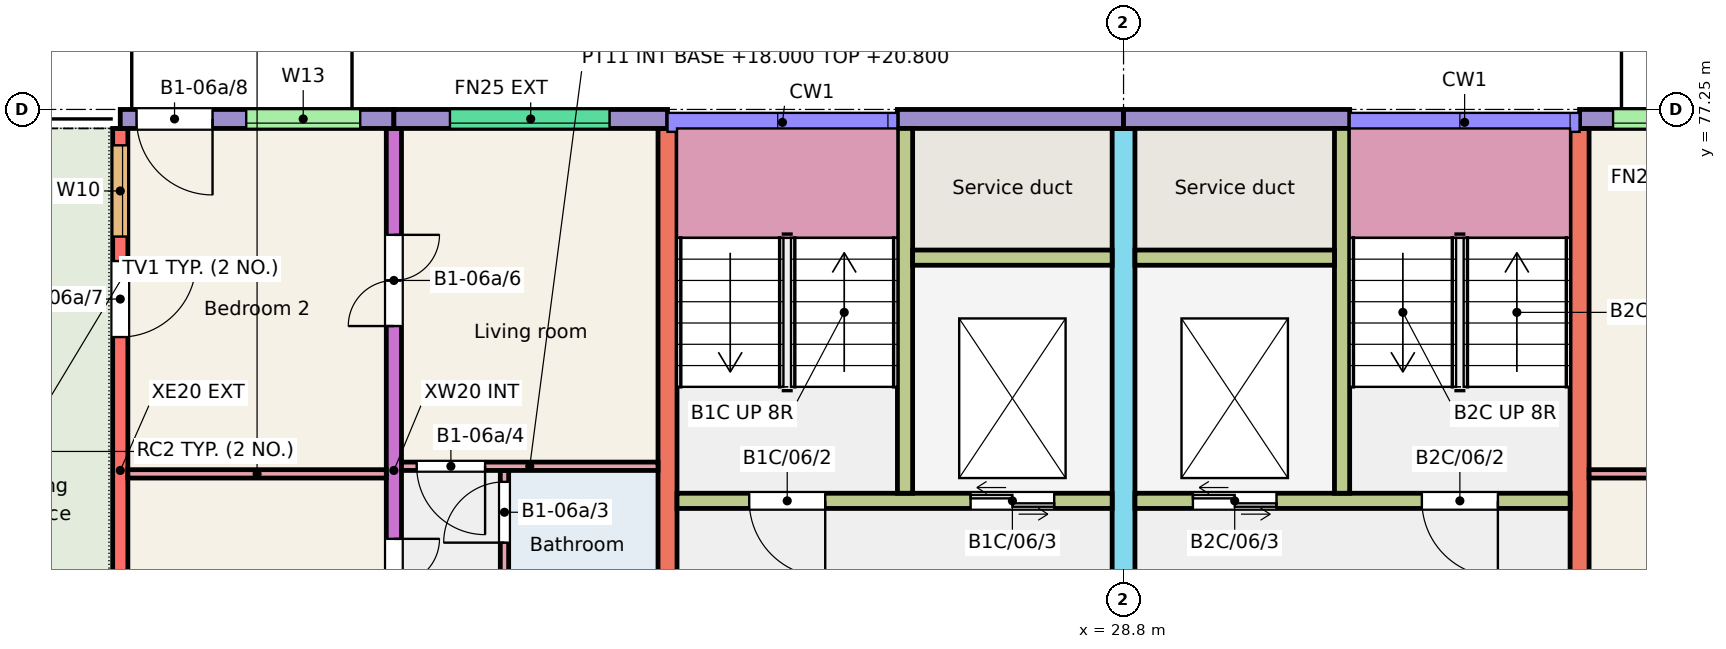
"""IFC4 building model, lengths in metres.
Left out: names, types, materials, properties, quantities, classifications, styles, units other than length and angle.
Written with IfcOpenShell. Run it as: python <this file> out.ifc"""

import sys

from ifc_helpers import new_model, si_unit, direction, frame, frame_2d, origin, place, context, subcontext, project, spatial, rectangle, extrude, element, fill, save


model = new_model("IFC4")
c1 = context("Model", 3, precision=1e-05, world=origin(), true_north=direction((0.0, 1.0)))
c2 = subcontext(c1, "Body", "Model", "MODEL_VIEW")
j1 = project(units=[si_unit("LENGTHUNIT", "METRE"), si_unit("PLANEANGLEUNIT", "RADIAN")], contexts=[c1])
p1 = place(None, origin())
s1 = spatial("IfcSite", under=j1, at=p1, CompositionType="ELEMENT")
p2 = place(p1, origin())
s2 = spatial("IfcBuilding", under=s1, at=p2, CompositionType="ELEMENT")
p3 = place(p2, frame((0.0, 0.0, 18.0)))
s3 = spatial("IfcBuildingStorey", under=s2, at=p3, CompositionType="ELEMENT", Elevation=18.0)
p4 = place(p3, frame((15.6, 68.0, 0.0), z_axis=(0.0, 0.0, 1.0), x_axis=(0.0, 1.0, 0.0)))
e1 = element("IfcWall", 1, at=p4, inside=s3, PredefinedType="SHEAR", context=c2, shape_type="SweptSolid", body=[
    extrude(rectangle(XDim=9.0, YDim=0.2, at=frame_2d((4.5, 0.0))), origin(), (0.0, 0.0, 1.0), 3.0),
])
p5 = place(p4, frame((1.45, 0.0, 0.9)))
e2 = element("IfcOpeningElement", 2, at=p5, cuts=e1, PredefinedType="OPENING", context=c2, shape_type="SweptSolid", body=[
    extrude(rectangle(XDim=1.5, YDim=1.5, at=frame_2d((0.75, 0.75))), frame((0.0, 0.11, 0.0), z_axis=(0.0, -1.0, 0.0), x_axis=(1.0, 0.0, 0.0)), (0.0, 0.0, 1.0), 0.22),
])
p6 = place(p4, frame((7.577, 0.0, 0.9)))
e3 = element("IfcOpeningElement", 3, at=p6, cuts=e1, PredefinedType="OPENING", context=c2, shape_type="SweptSolid", body=[
    extrude(rectangle(XDim=1.2, YDim=1.5, at=frame_2d((0.6, 0.75))), frame((0.0, 0.11, 0.0), z_axis=(0.0, -1.0, 0.0), x_axis=(1.0, 0.0, 0.0)), (0.0, 0.0, 1.0), 0.22),
])
p7 = place(p4, frame((6.255, 0.0, 0.0)))
e4 = element("IfcOpeningElement", 4, at=p7, cuts=e1, PredefinedType="OPENING", context=c2, shape_type="SweptSolid", body=[
    extrude(rectangle(XDim=1.0, YDim=2.1, at=frame_2d((0.5, 1.05))), frame((0.0, 0.11, 0.0), z_axis=(0.0, -1.0, 0.0), x_axis=(1.0, 0.0, 0.0)), (0.0, 0.0, 1.0), 0.22),
])
p8 = place(p3, frame((19.2, 68.0, 0.0), z_axis=(0.0, 0.0, 1.0), x_axis=(0.0, 1.0, 0.0)))
e5 = element("IfcWall", 5, at=p8, inside=s3, PredefinedType="SHEAR", context=c2, shape_type="SweptSolid", body=[
    extrude(rectangle(XDim=9.0, YDim=0.2, at=frame_2d((4.5, 0.0))), origin(), (0.0, 0.0, 1.0), 3.0),
])
p9 = place(p8, frame((2.4, 0.0, 0.0)))
e6 = element("IfcOpeningElement", 6, at=p9, cuts=e5, PredefinedType="OPENING", context=c2, shape_type="SweptSolid", body=[
    extrude(rectangle(XDim=1.2, YDim=2.1, at=frame_2d((0.6, 1.05))), frame((0.0, 0.11, 0.0), z_axis=(0.0, -1.0, 0.0), x_axis=(1.0, 0.0, 0.0)), (0.0, 0.0, 1.0), 0.22),
])
p10 = place(p8, frame((6.4, 0.0, 0.0)))
e7 = element("IfcOpeningElement", 7, at=p10, cuts=e5, PredefinedType="OPENING", context=c2, shape_type="SweptSolid", body=[
    extrude(rectangle(XDim=1.2, YDim=2.1, at=frame_2d((0.6, 1.05))), frame((0.0, 0.11, 0.0), z_axis=(0.0, -1.0, 0.0), x_axis=(1.0, 0.0, 0.0)), (0.0, 0.0, 1.0), 0.22),
])
p11 = place(p3, frame((22.8, 68.0, 0.0), z_axis=(0.0, 0.0, 1.0), x_axis=(0.0, 1.0, 0.0)))
e8 = element("IfcWall", 8, at=p11, inside=s3, PredefinedType="SHEAR", context=c2, shape_type="SweptSolid", body=[
    extrude(rectangle(XDim=9.0, YDim=0.25, at=frame_2d((4.5, 0.0))), origin(), (0.0, 0.0, 1.0), 3.0),
])
p12 = place(p3, frame((28.8, 66.0, 0.0), z_axis=(0.0, 0.0, 1.0), x_axis=(0.0, 1.0, 0.0)))
e9 = element("IfcWall", 9, at=p12, inside=s3, PredefinedType="SHEAR", context=c2, shape_type="SweptSolid", body=[
    extrude(rectangle(XDim=11.0, YDim=0.3, at=frame_2d((5.5, 0.0))), origin(), (0.0, 0.0, 1.0), 3.0),
])
p13 = place(p12, frame((0.3, 0.0, 0.0)))
e10 = element("IfcOpeningElement", 10, at=p13, cuts=e9, PredefinedType="OPENING", context=c2, shape_type="SweptSolid", body=[
    extrude(rectangle(XDim=1.2, YDim=2.1, at=frame_2d((0.6, 1.05))), frame((0.0, 0.16, 0.0), z_axis=(0.0, -1.0, 0.0), x_axis=(1.0, 0.0, 0.0)), (0.0, 0.0, 1.0), 0.32),
])
p14 = place(p3, frame((34.8, 68.0, 0.0), z_axis=(0.0, 0.0, 1.0), x_axis=(0.0, 1.0, 0.0)))
e11 = element("IfcWall", 11, at=p14, inside=s3, PredefinedType="SHEAR", context=c2, shape_type="SweptSolid", body=[
    extrude(rectangle(XDim=9.0, YDim=0.25, at=frame_2d((4.5, 0.0))), origin(), (0.0, 0.0, 1.0), 3.0),
])
p15 = place(p3, frame((15.6, 77.125, 0.0), z_axis=(0.0, 0.0, 1.0), x_axis=(1.0, 0.0, 0.0)))
e12 = element("IfcWall", 12, at=p15, inside=s3, PredefinedType="SOLIDWALL", context=c2, shape_type="SweptSolid", body=[
    extrude(rectangle(XDim=3.6, YDim=0.25, at=frame_2d((1.8, 0.0))), origin(), (0.0, 0.0, 1.0), 3.0),
])
p16 = place(p15, frame((1.657, 0.0, 1.2)))
e13 = element("IfcOpeningElement", 13, at=p16, cuts=e12, PredefinedType="OPENING", context=c2, shape_type="SweptSolid", body=[
    extrude(rectangle(XDim=1.5, YDim=1.2, at=frame_2d((0.75, 0.6))), frame((0.0, 0.135, 0.0), z_axis=(0.0, -1.0, 0.0), x_axis=(1.0, 0.0, 0.0)), (0.0, 0.0, 1.0), 0.27),
])
p17 = place(p15, frame((0.214, 0.0, 0.0)))
e14 = element("IfcOpeningElement", 14, at=p17, cuts=e12, PredefinedType="OPENING", context=c2, shape_type="SweptSolid", body=[
    extrude(rectangle(XDim=1.0, YDim=2.1, at=frame_2d((0.5, 1.05))), frame((0.0, 0.135, 0.0), z_axis=(0.0, -1.0, 0.0), x_axis=(1.0, 0.0, 0.0)), (0.0, 0.0, 1.0), 0.27),
])
p18 = place(p3, frame((19.2, 77.125, 0.0), z_axis=(0.0, 0.0, 1.0), x_axis=(1.0, 0.0, 0.0)))
e15 = element("IfcWall", 15, at=p18, inside=s3, PredefinedType="SOLIDWALL", context=c2, shape_type="SweptSolid", body=[
    extrude(rectangle(XDim=3.6, YDim=0.25, at=frame_2d((1.8, 0.0))), origin(), (0.0, 0.0, 1.0), 3.0),
])
p19 = place(p18, frame((0.738, 0.0, 1.2)))
e16 = element("IfcOpeningElement", 16, at=p19, cuts=e15, PredefinedType="OPENING", context=c2, shape_type="SweptSolid", body=[
    extrude(rectangle(XDim=2.1, YDim=1.2, at=frame_2d((1.05, 0.6))), frame((0.0, 0.135, 0.0), z_axis=(0.0, -1.0, 0.0), x_axis=(1.0, 0.0, 0.0)), (0.0, 0.0, 1.0), 0.27),
])
p20 = place(p3, frame((25.825, 77.125, 0.0), z_axis=(0.0, 0.0, 1.0), x_axis=(1.0, 0.0, 0.0)))
e17 = element("IfcWall", 17, at=p20, inside=s3, PredefinedType="SOLIDWALL", context=c2, shape_type="SweptSolid", body=[
    extrude(rectangle(XDim=2.975, YDim=0.25, at=frame_2d((1.488, 0.0))), origin(), (0.0, 0.0, 1.0), 3.0),
])
p21 = place(p3, frame((22.925, 72.1, 0.0), z_axis=(0.0, 0.0, 1.0), x_axis=(1.0, 0.0, 0.0)))
e18 = element("IfcWall", 18, at=p21, inside=s3, PredefinedType="SHEAR", context=c2, shape_type="SweptSolid", body=[
    extrude(rectangle(XDim=5.725, YDim=0.2, at=frame_2d((2.862, 0.0))), origin(), (0.0, 0.0, 1.0), 3.0),
])
p22 = place(p21, frame((0.95, 0.0, 0.0)))
e19 = element("IfcOpeningElement", 19, at=p22, cuts=e18, PredefinedType="OPENING", context=c2, shape_type="SweptSolid", body=[
    extrude(rectangle(XDim=1.0, YDim=2.1, at=frame_2d((0.5, 1.05))), frame((0.0, 0.11, 0.0), z_axis=(0.0, -1.0, 0.0), x_axis=(1.0, 0.0, 0.0)), (0.0, 0.0, 1.0), 0.22),
])
p23 = place(p21, frame((3.863, 0.0, 0.0)))
e20 = element("IfcOpeningElement", 20, at=p23, cuts=e18, PredefinedType="OPENING", context=c2, shape_type="SweptSolid", body=[
    extrude(rectangle(XDim=1.1, YDim=2.1, at=frame_2d((0.55, 1.05))), frame((0.0, 0.11, 0.0), z_axis=(0.0, -1.0, 0.0), x_axis=(1.0, 0.0, 0.0)), (0.0, 0.0, 1.0), 0.22),
])
p24 = place(p3, frame((25.925, 72.2, 0.0), z_axis=(0.0, 0.0, 1.0), x_axis=(0.0, 1.0, 0.0)))
e21 = element("IfcWall", 21, at=p24, inside=s3, PredefinedType="SHEAR", context=c2, shape_type="SweptSolid", body=[
    extrude(rectangle(XDim=4.8, YDim=0.2, at=frame_2d((2.4, 0.0))), origin(), (0.0, 0.0, 1.0), 3.0),
])
p25 = place(p3, frame((26.025, 75.3, 0.0), z_axis=(0.0, 0.0, 1.0), x_axis=(1.0, 0.0, 0.0)))
e22 = element("IfcWall", 22, at=p25, inside=s3, PredefinedType="SHEAR", context=c2, shape_type="SweptSolid", body=[
    extrude(rectangle(XDim=2.625, YDim=0.2, at=frame_2d((1.312, 0.0))), origin(), (0.0, 0.0, 1.0), 3.0),
])
p26 = place(p3, frame((28.8, 77.125, 0.0), z_axis=(0.0, 0.0, 1.0), x_axis=(1.0, 0.0, 0.0)))
e23 = element("IfcWall", 23, at=p26, inside=s3, PredefinedType="SOLIDWALL", context=c2, shape_type="SweptSolid", body=[
    extrude(rectangle(XDim=2.975, YDim=0.25, at=frame_2d((1.487, 0.0))), origin(), (0.0, 0.0, 1.0), 3.0),
])
p27 = place(p3, frame((28.95, 72.1, 0.0), z_axis=(0.0, 0.0, 1.0), x_axis=(1.0, 0.0, 0.0)))
e24 = element("IfcWall", 24, at=p27, inside=s3, PredefinedType="SHEAR", context=c2, shape_type="SweptSolid", body=[
    extrude(rectangle(XDim=5.725, YDim=0.2, at=frame_2d((2.863, 0.0))), origin(), (0.0, 0.0, 1.0), 3.0),
])
p28 = place(p27, frame((3.775, 0.0, 0.0)))
e25 = element("IfcOpeningElement", 25, at=p28, cuts=e24, PredefinedType="OPENING", context=c2, shape_type="SweptSolid", body=[
    extrude(rectangle(XDim=1.0, YDim=2.1, at=frame_2d((0.5, 1.05))), frame((0.0, 0.11, 0.0), z_axis=(0.0, -1.0, 0.0), x_axis=(1.0, 0.0, 0.0)), (0.0, 0.0, 1.0), 0.22),
])
p29 = place(p27, frame((0.762, 0.0, 0.0)))
e26 = element("IfcOpeningElement", 26, at=p29, cuts=e24, PredefinedType="OPENING", context=c2, shape_type="SweptSolid", body=[
    extrude(rectangle(XDim=1.1, YDim=2.1, at=frame_2d((0.55, 1.05))), frame((0.0, 0.11, 0.0), z_axis=(0.0, -1.0, 0.0), x_axis=(1.0, 0.0, 0.0)), (0.0, 0.0, 1.0), 0.22),
])
p30 = place(p3, frame((31.675, 72.2, 0.0), z_axis=(0.0, 0.0, 1.0), x_axis=(0.0, 1.0, 0.0)))
e27 = element("IfcWall", 27, at=p30, inside=s3, PredefinedType="SHEAR", context=c2, shape_type="SweptSolid", body=[
    extrude(rectangle(XDim=4.8, YDim=0.2, at=frame_2d((2.4, 0.0))), origin(), (0.0, 0.0, 1.0), 3.0),
])
p31 = place(p3, frame((28.95, 75.3, 0.0), z_axis=(0.0, 0.0, 1.0), x_axis=(1.0, 0.0, 0.0)))
e28 = element("IfcWall", 28, at=p31, inside=s3, PredefinedType="SHEAR", context=c2, shape_type="SweptSolid", body=[
    extrude(rectangle(XDim=2.625, YDim=0.2, at=frame_2d((1.312, 0.0))), origin(), (0.0, 0.0, 1.0), 3.0),
])
p32 = place(p3, frame((34.8, 77.125, 0.0), z_axis=(0.0, 0.0, 1.0), x_axis=(1.0, 0.0, 0.0)))
e29 = element("IfcWall", 29, at=p32, inside=s3, PredefinedType="SOLIDWALL", context=c2, shape_type="SweptSolid", body=[
    extrude(rectangle(XDim=3.6, YDim=0.25, at=frame_2d((1.8, 0.0))), origin(), (0.0, 0.0, 1.0), 3.0),
])
p33 = place(p32, frame((0.44, 0.0, 1.2)))
e30 = element("IfcOpeningElement", 30, at=p33, cuts=e29, PredefinedType="OPENING", context=c2, shape_type="SweptSolid", body=[
    extrude(rectangle(XDim=1.5, YDim=1.2, at=frame_2d((0.75, 0.6))), frame((0.0, 0.135, 0.0), z_axis=(0.0, -1.0, 0.0), x_axis=(1.0, 0.0, 0.0)), (0.0, 0.0, 1.0), 0.27),
])
p34 = place(p32, frame((2.356, 0.0, 0.0)))
e31 = element("IfcOpeningElement", 31, at=p34, cuts=e29, PredefinedType="OPENING", context=c2, shape_type="SweptSolid", body=[
    extrude(rectangle(XDim=1.0, YDim=2.1, at=frame_2d((0.5, 1.05))), frame((0.0, 0.135, 0.0), z_axis=(0.0, -1.0, 0.0), x_axis=(1.0, 0.0, 0.0)), (0.0, 0.0, 1.0), 0.27),
])
p35 = place(p3, frame((20.655, 68.0, 0.0), z_axis=(0.0, 0.0, 1.0), x_axis=(0.0, 1.0, 0.0)))
e32 = element("IfcWall", 32, at=p35, inside=s3, PredefinedType="PARTITIONING", context=c2, shape_type="SweptSolid", body=[
    extrude(rectangle(XDim=4.5, YDim=0.11, at=frame_2d((2.25, 0.0))), origin(), (0.0, 0.0, 1.0), 2.8),
])
p36 = place(p35, frame((0.2, 0.0, 0.0)))
e33 = element("IfcOpeningElement", 33, at=p36, cuts=e32, PredefinedType="OPENING", context=c2, shape_type="SweptSolid", body=[
    extrude(rectangle(XDim=0.8, YDim=2.1, at=frame_2d((0.4, 1.05))), frame((0.0, 0.065, 0.0), z_axis=(0.0, -1.0, 0.0), x_axis=(1.0, 0.0, 0.0)), (0.0, 0.0, 1.0), 0.13),
])
p37 = place(p35, frame((3.55, 0.0, 0.0)))
e34 = element("IfcOpeningElement", 34, at=p37, cuts=e32, PredefinedType="OPENING", context=c2, shape_type="SweptSolid", body=[
    extrude(rectangle(XDim=0.8, YDim=2.1, at=frame_2d((0.4, 1.05))), frame((0.0, 0.065, 0.0), z_axis=(0.0, -1.0, 0.0), x_axis=(1.0, 0.0, 0.0)), (0.0, 0.0, 1.0), 0.13),
])
p38 = place(p3, frame((19.3, 72.555, 0.0), z_axis=(0.0, 0.0, 1.0), x_axis=(1.0, 0.0, 0.0)))
e35 = element("IfcWall", 35, at=p38, inside=s3, PredefinedType="PARTITIONING", context=c2, shape_type="SweptSolid", body=[
    extrude(rectangle(XDim=3.375, YDim=0.11, at=frame_2d((1.688, 0.0))), origin(), (0.0, 0.0, 1.0), 2.8),
])
p39 = place(p38, frame((0.2, 0.0, 0.0)))
e36 = element("IfcOpeningElement", 36, at=p39, cuts=e35, PredefinedType="OPENING", context=c2, shape_type="SweptSolid", body=[
    extrude(rectangle(XDim=0.9, YDim=2.1, at=frame_2d((0.45, 1.05))), frame((0.0, 0.065, 0.0), z_axis=(0.0, -1.0, 0.0), x_axis=(1.0, 0.0, 0.0)), (0.0, 0.0, 1.0), 0.13),
])
p40 = place(p3, frame((15.7, 72.455, 0.0), z_axis=(0.0, 0.0, 1.0), x_axis=(1.0, 0.0, 0.0)))
e37 = element("IfcWall", 37, at=p40, inside=s3, PredefinedType="PARTITIONING", context=c2, shape_type="SweptSolid", body=[
    extrude(rectangle(XDim=3.4, YDim=0.11, at=frame_2d((1.7, 0.0))), origin(), (0.0, 0.0, 1.0), 2.75),
])
p41 = place(p3, frame((34.925, 72.455, 0.0), z_axis=(0.0, 0.0, 1.0), x_axis=(1.0, 0.0, 0.0)))
e38 = element("IfcWall", 38, at=p41, inside=s3, PredefinedType="PARTITIONING", context=c2, shape_type="SweptSolid", body=[
    extrude(rectangle(XDim=3.375, YDim=0.11, at=frame_2d((1.688, 0.0))), origin(), (0.0, 0.0, 1.0), 2.8),
])
p42 = place(p16, origin())
e39 = element("IfcWindow", 39, at=p42, inside=s3, PartitioningType="SINGLE_PANEL", PredefinedType="WINDOW", context=c2, shape_type="SweptSolid", body=[
    extrude(rectangle(XDim=1.5, YDim=1.2, at=frame_2d((0.75, 0.6))), frame((0.0, -0.025, 0.0), z_axis=(0.0, -1.0, 0.0), x_axis=(1.0, 0.0, 0.0)), (0.0, 0.0, 1.0), 0.06),
])
fill(e13, e39)
p43 = place(p19, origin())
e40 = element("IfcWindow", 40, at=p43, inside=s3, PartitioningType="SINGLE_PANEL", PredefinedType="WINDOW", context=c2, shape_type="SweptSolid", body=[
    extrude(rectangle(XDim=2.1, YDim=1.2, at=frame_2d((1.05, 0.6))), frame((0.0, -0.025, 0.0), z_axis=(0.0, -1.0, 0.0), x_axis=(1.0, 0.0, 0.0)), (0.0, 0.0, 1.0), 0.06),
])
fill(e16, e40)
p44 = place(p6, origin())
e41 = element("IfcWindow", 41, at=p44, inside=s3, PartitioningType="SINGLE_PANEL", PredefinedType="WINDOW", context=c2, shape_type="SweptSolid", body=[
    extrude(rectangle(XDim=1.2, YDim=1.5, at=frame_2d((0.6, 0.75))), frame((0.0, 0.0, 0.0), z_axis=(0.0, -1.0, 0.0), x_axis=(1.0, 0.0, 0.0)), (0.0, 0.0, 1.0), 0.06),
])
fill(e3, e41)
p45 = place(p33, origin())
e42 = element("IfcWindow", 42, at=p45, inside=s3, PartitioningType="SINGLE_PANEL", PredefinedType="WINDOW", context=c2, shape_type="SweptSolid", body=[
    extrude(rectangle(XDim=1.5, YDim=1.2, at=frame_2d((0.75, 0.6))), frame((0.0, -0.025, 0.0), z_axis=(0.0, -1.0, 0.0), x_axis=(1.0, 0.0, 0.0)), (0.0, 0.0, 1.0), 0.06),
])
fill(e30, e42)
p46 = place(p37, origin())
e43 = element("IfcDoor", 43, at=p46, inside=s3, OperationType="SINGLE_SWING_LEFT", PredefinedType="DOOR", context=c2, shape_type="SweptSolid", body=[
    extrude(rectangle(XDim=0.8, YDim=2.1, at=frame_2d((0.4, 1.05))), frame((0.0, 0.025, 0.0), z_axis=(0.0, -1.0, 0.0), x_axis=(1.0, 0.0, 0.0)), (0.0, 0.0, 1.0), 0.05),
])
fill(e34, e43)
p47 = place(p39, origin())
e44 = element("IfcDoor", 44, at=p47, inside=s3, OperationType="SINGLE_SWING_RIGHT", PredefinedType="DOOR", context=c2, shape_type="SweptSolid", body=[
    extrude(rectangle(XDim=0.9, YDim=2.1, at=frame_2d((0.45, 1.05))), frame((0.0, 0.025, 0.0), z_axis=(0.0, -1.0, 0.0), x_axis=(1.0, 0.0, 0.0)), (0.0, 0.0, 1.0), 0.05),
])
fill(e36, e44)
p48 = place(p9, origin())
e45 = element("IfcDoor", 45, at=p48, inside=s3, OperationType="DOUBLE_DOOR_SINGLE_SWING", PredefinedType="DOOR", context=c2, shape_type="SweptSolid", body=[
    extrude(rectangle(XDim=1.2, YDim=2.1, at=frame_2d((0.6, 1.05))), frame((0.0, 0.025, 0.0), z_axis=(0.0, -1.0, 0.0), x_axis=(1.0, 0.0, 0.0)), (0.0, 0.0, 1.0), 0.05),
])
fill(e6, e45)
p49 = place(p10, origin())
e46 = element("IfcDoor", 46, at=p49, inside=s3, OperationType="DOUBLE_DOOR_SINGLE_SWING", PredefinedType="DOOR", context=c2, shape_type="SweptSolid", body=[
    extrude(rectangle(XDim=1.2, YDim=2.1, at=frame_2d((0.6, 1.05))), frame((0.0, 0.025, 0.0), z_axis=(0.0, -1.0, 0.0), x_axis=(1.0, 0.0, 0.0)), (0.0, 0.0, 1.0), 0.05),
])
fill(e7, e46)
p50 = place(p7, origin())
e47 = element("IfcDoor", 47, at=p50, inside=s3, OperationType="SINGLE_SWING_RIGHT", PredefinedType="DOOR", context=c2, shape_type="SweptSolid", body=[
    extrude(rectangle(XDim=1.0, YDim=2.1, at=frame_2d((0.5, 1.05))), frame((0.0, 0.025, 0.0), z_axis=(0.0, -1.0, 0.0), x_axis=(1.0, 0.0, 0.0)), (0.0, 0.0, 1.0), 0.05),
])
fill(e4, e47)
p51 = place(p17, origin())
e48 = element("IfcDoor", 48, at=p51, inside=s3, OperationType="SINGLE_SWING_RIGHT", PredefinedType="DOOR", context=c2, shape_type="SweptSolid", body=[
    extrude(rectangle(XDim=1.0, YDim=2.1, at=frame_2d((0.5, 1.05))), frame((0.0, 0.025, 0.0), z_axis=(0.0, -1.0, 0.0), x_axis=(1.0, 0.0, 0.0)), (0.0, 0.0, 1.0), 0.05),
])
fill(e14, e48)
p52 = place(p22, origin())
e49 = element("IfcDoor", 49, at=p52, inside=s3, OperationType="SINGLE_SWING_RIGHT", PredefinedType="DOOR", context=c2, shape_type="SweptSolid", body=[
    extrude(rectangle(XDim=1.0, YDim=2.1, at=frame_2d((0.5, 1.05))), frame((0.0, 0.025, 0.0), z_axis=(0.0, -1.0, 0.0), x_axis=(1.0, 0.0, 0.0)), (0.0, 0.0, 1.0), 0.05),
])
fill(e19, e49)
p53 = place(p23, origin())
e50 = element("IfcDoor", 50, at=p53, inside=s3, OperationType="DOUBLE_DOOR_SLIDING", PredefinedType="DOOR", context=c2, shape_type="SweptSolid", body=[
    extrude(rectangle(XDim=1.1, YDim=2.1, at=frame_2d((0.55, 1.05))), frame((0.0, 0.025, 0.0), z_axis=(0.0, -1.0, 0.0), x_axis=(1.0, 0.0, 0.0)), (0.0, 0.0, 1.0), 0.05),
])
fill(e20, e50)
p54 = place(p28, origin())
e51 = element("IfcDoor", 51, at=p54, inside=s3, OperationType="SINGLE_SWING_RIGHT", PredefinedType="DOOR", context=c2, shape_type="SweptSolid", body=[
    extrude(rectangle(XDim=1.0, YDim=2.1, at=frame_2d((0.5, 1.05))), frame((0.0, 0.025, 0.0), z_axis=(0.0, -1.0, 0.0), x_axis=(1.0, 0.0, 0.0)), (0.0, 0.0, 1.0), 0.05),
])
fill(e25, e51)
p55 = place(p29, origin())
e52 = element("IfcDoor", 52, at=p55, inside=s3, OperationType="DOUBLE_DOOR_SLIDING", PredefinedType="DOOR", context=c2, shape_type="SweptSolid", body=[
    extrude(rectangle(XDim=1.1, YDim=2.1, at=frame_2d((0.55, 1.05))), frame((0.0, 0.025, 0.0), z_axis=(0.0, -1.0, 0.0), x_axis=(1.0, 0.0, 0.0)), (0.0, 0.0, 1.0), 0.05),
])
fill(e26, e52)
save(model, sys.argv[1])
